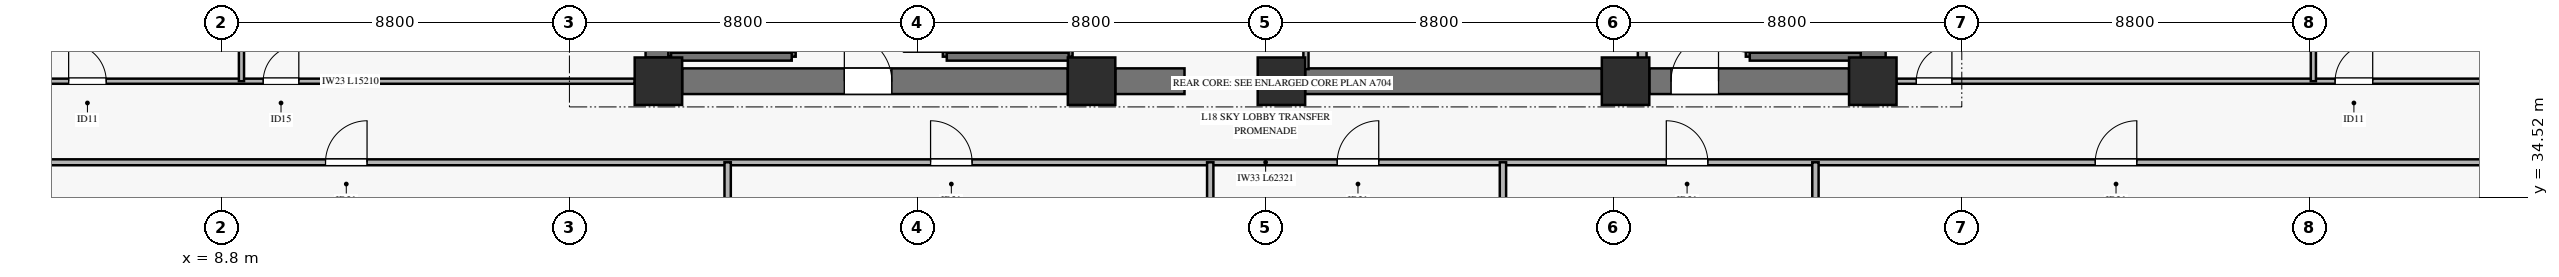
"""IFC4 building model, lengths in metres.
Left out: names, types, materials, properties, quantities, classifications, styles, units other than length and angle.
Written with IfcOpenShell. Run it as: python <this file> out.ifc"""

import sys

from ifc_helpers import new_model, si_unit, direction, frame, frame_2d, origin, origin_2d, place, context, subcontext, project, spatial, rectangle, extrude, source, transform, mapped, element, fill, save


model = new_model("IFC4")
c1 = context("Model", 3, precision=1e-05, world=origin(), true_north=direction((0.0, 1.0)))
c2 = subcontext(c1, "Body", "Model", "MODEL_VIEW")
j1 = project(units=[si_unit("LENGTHUNIT", "METRE"), si_unit("PLANEANGLEUNIT", "RADIAN")], contexts=[c1])
p1 = place(None, origin())
s1 = spatial("IfcSite", under=j1, at=p1, CompositionType="ELEMENT")
p2 = place(p1, origin())
s2 = spatial("IfcBuilding", under=s1, at=p2, CompositionType="ELEMENT")
p3 = place(p2, frame((0.0, 0.0, 72.8)))
s3 = spatial("IfcBuildingStorey", under=s2, at=p3, CompositionType="ELEMENT", Elevation=72.8)
m1 = source(origin(), c2, "Body", "SweptSolid", [
    extrude(rectangle(XDim=1.2, YDim=1.2, at=origin_2d()), origin(), (0.0, 0.0, 1.0), 6.58),
])
for number, where, z_axis, x_axis in (
    (1, (19.85, 37.45, 0.0), (0.0, 0.0, 1.0), (1.0, 0.0, 0.0)),
    (2, (30.8, 37.45, 0.0), (0.0, 0.0, 1.0), (1.0, 0.0, 0.0)),
    (3, (35.6, 37.45, 0.0), (0.0, 0.0, 1.0), (1.0, 0.0, 0.0)),
    (4, (44.3, 37.45, 0.0), (0.0, 0.0, 1.0), (1.0, 0.0, 0.0)),
    (5, (50.55, 37.45, 0.0), (0.0, 0.0, 1.0), (1.0, 0.0, 0.0)),
):
    element("IfcColumn", number, at=place(p3, frame(where, z_axis=z_axis, x_axis=x_axis)), inside=s3, PredefinedType="PILASTER", context=c2, shape_type="MappedRepresentation", body=[
        mapped(m1, transform((0.0, 0.0, 0.0), x_axis=(1.0, 0.0, 0.0), y_axis=(0.0, 1.0, 0.0), z_axis=(0.0, 0.0, 1.0), scale=1.0)),
    ])
p4 = place(p3, frame((20.45, 37.45, 0.0), z_axis=(0.0, 0.0, 1.0), x_axis=(1.0, 0.0, 0.0)))
e6 = element("IfcWall", 6, at=p4, inside=s3, PredefinedType="SHEAR", context=c2, shape_type="SweptSolid", body=[
    extrude(rectangle(XDim=9.75, YDim=0.65, at=frame_2d((4.875, 0.0))), origin(), (0.0, 0.0, 1.0), 6.58),
])
p5 = place(p4, frame((4.1, 0.0, 0.0)))
e7 = element("IfcOpeningElement", 7, at=p5, cuts=e6, PredefinedType="OPENING", context=c2, shape_type="SweptSolid", body=[
    extrude(rectangle(XDim=1.2, YDim=2.15, at=frame_2d((0.6, 1.075))), frame((0.0, 0.335, 0.0), z_axis=(0.0, -1.0, 0.0), x_axis=(1.0, 0.0, 0.0)), (0.0, 0.0, 1.0), 0.67),
])
p6 = place(p3, frame((31.4, 37.45, 0.0), z_axis=(0.0, 0.0, 1.0), x_axis=(1.0, 0.0, 0.0)))
e8 = element("IfcWall", 8, at=p6, inside=s3, PredefinedType="SHEAR", context=c2, shape_type="SweptSolid", body=[
    extrude(rectangle(XDim=1.75, YDim=0.65, at=frame_2d((0.875, 0.0))), origin(), (0.0, 0.0, 1.0), 6.58),
])
p7 = place(p3, frame((36.2, 37.45, 0.0), z_axis=(0.0, 0.0, 1.0), x_axis=(1.0, 0.0, 0.0)))
e9 = element("IfcWall", 9, at=p7, inside=s3, PredefinedType="SHEAR", context=c2, shape_type="SweptSolid", body=[
    extrude(rectangle(XDim=7.5, YDim=0.65, at=frame_2d((3.75, 0.0))), origin(), (0.0, 0.0, 1.0), 6.58),
])
p8 = place(p3, frame((44.9, 37.45, 0.0), z_axis=(0.0, 0.0, 1.0), x_axis=(1.0, 0.0, 0.0)))
e10 = element("IfcWall", 10, at=p8, inside=s3, PredefinedType="SHEAR", context=c2, shape_type="SweptSolid", body=[
    extrude(rectangle(XDim=5.05, YDim=0.65, at=frame_2d((2.525, 0.0))), origin(), (0.0, 0.0, 1.0), 6.58),
])
p9 = place(p8, frame((0.55, 0.0, 0.0)))
e11 = element("IfcOpeningElement", 11, at=p9, cuts=e10, PredefinedType="OPENING", context=c2, shape_type="SweptSolid", body=[
    extrude(rectangle(XDim=1.2, YDim=2.15, at=frame_2d((0.6, 1.075))), frame((0.0, 0.335, 0.0), z_axis=(0.0, -1.0, 0.0), x_axis=(1.0, 0.0, 0.0)), (0.0, 0.0, 1.0), 0.67),
])
for number, where, z_axis, x_axis in (
    (12, (19.85, 38.05, 0.0), (0.0, 0.0, 1.0), (0.0, 1.0, 0.0)),
    (13, (50.55, 38.05, 0.0), (0.0, 0.0, 1.0), (0.0, 1.0, 0.0)),
):
    element("IfcWall", number, at=place(p3, frame(where, z_axis=z_axis, x_axis=x_axis)), inside=s3, PredefinedType="SHEAR", context=c2, shape_type="SweptSolid", body=[
        extrude(rectangle(XDim=7.9, YDim=0.65, at=frame_2d((3.95, 0.0))), origin(), (0.0, 0.0, 1.0), 6.58),
    ])
p10 = place(p3, frame((20.17, 38.07, 0.0), z_axis=(0.0, 0.0, 1.0), x_axis=(0.0, 1.0, 0.0)))
e14 = element("IfcWall", 14, at=p10, inside=s3, PredefinedType="SOLIDWALL", context=c2, shape_type="SweptSolid", body=[
    extrude(rectangle(XDim=7.25, YDim=0.14, at=frame_2d((3.625, 0.0))), origin(), (0.0, 0.0, 1.0), 6.8),
])
p11 = place(p3, frame((23.22, 38.07, 0.0), z_axis=(0.0, 0.0, 1.0), x_axis=(0.0, 1.0, 0.0)))
e15 = element("IfcWall", 15, at=p11, inside=s3, PredefinedType="SOLIDWALL", context=c2, shape_type="SweptSolid", body=[
    extrude(rectangle(XDim=7.25, YDim=0.2, at=frame_2d((3.625, 0.0))), origin(), (0.0, 0.0, 1.0), 6.8),
])
p12 = place(p11, frame((0.11, 0.0, 0.0)))
e16 = element("IfcOpeningElement", 16, at=p12, cuts=e15, PredefinedType="OPENING", context=c2, shape_type="SweptSolid", body=[
    extrude(rectangle(XDim=1.1, YDim=2.15, at=frame_2d((0.55, 1.075))), frame((0.0, 0.11, 0.0), z_axis=(0.0, -1.0, 0.0), x_axis=(1.0, 0.0, 0.0)), (0.0, 0.0, 1.0), 0.22),
])
p13 = place(p3, frame((20.17, 38.07, 0.0), z_axis=(0.0, 0.0, 1.0), x_axis=(1.0, 0.0, 0.0)))
e17 = element("IfcWall", 17, at=p13, inside=s3, PredefinedType="SOLIDWALL", context=c2, shape_type="SweptSolid", body=[
    extrude(rectangle(XDim=3.05, YDim=0.2, at=frame_2d((1.525, 0.0))), origin(), (0.0, 0.0, 1.0), 6.8),
])
p14 = place(p3, frame((27.14, 38.07, 0.0), z_axis=(0.0, 0.0, 1.0), x_axis=(0.0, 1.0, 0.0)))
e18 = element("IfcWall", 18, at=p14, inside=s3, PredefinedType="SOLIDWALL", context=c2, shape_type="SweptSolid", body=[
    extrude(rectangle(XDim=7.25, YDim=0.2, at=frame_2d((3.625, 0.0))), origin(), (0.0, 0.0, 1.0), 6.8),
])
p15 = place(p14, frame((0.11, 0.0, 0.0)))
e19 = element("IfcOpeningElement", 19, at=p15, cuts=e18, PredefinedType="OPENING", context=c2, shape_type="SweptSolid", body=[
    extrude(rectangle(XDim=1.1, YDim=2.15, at=frame_2d((0.55, 1.075))), frame((0.0, 0.11, 0.0), z_axis=(0.0, -1.0, 0.0), x_axis=(1.0, 0.0, 0.0)), (0.0, 0.0, 1.0), 0.22),
])
p16 = place(p3, frame((30.22, 38.07, 0.0), z_axis=(0.0, 0.0, 1.0), x_axis=(0.0, 1.0, 0.0)))
e20 = element("IfcWall", 20, at=p16, inside=s3, PredefinedType="SOLIDWALL", context=c2, shape_type="SweptSolid", body=[
    extrude(rectangle(XDim=7.25, YDim=0.2, at=frame_2d((3.625, 0.0))), origin(), (0.0, 0.0, 1.0), 6.8),
])
p17 = place(p3, frame((27.14, 38.07, 0.0), z_axis=(0.0, 0.0, 1.0), x_axis=(1.0, 0.0, 0.0)))
e21 = element("IfcWall", 21, at=p17, inside=s3, PredefinedType="SOLIDWALL", context=c2, shape_type="SweptSolid", body=[
    extrude(rectangle(XDim=3.08, YDim=0.2, at=frame_2d((1.54, 0.0))), origin(), (0.0, 0.0, 1.0), 6.8),
])
p18 = place(p3, frame((47.44, 38.07, 0.0), z_axis=(0.0, 0.0, 1.0), x_axis=(0.0, 1.0, 0.0)))
e22 = element("IfcWall", 22, at=p18, inside=s3, PredefinedType="SOLIDWALL", context=c2, shape_type="SweptSolid", body=[
    extrude(rectangle(XDim=7.25, YDim=0.2, at=frame_2d((3.625, 0.0))), origin(), (0.0, 0.0, 1.0), 6.8),
])
p19 = place(p18, frame((0.11, 0.0, 0.0)))
e23 = element("IfcOpeningElement", 23, at=p19, cuts=e22, PredefinedType="OPENING", context=c2, shape_type="SweptSolid", body=[
    extrude(rectangle(XDim=1.1, YDim=2.15, at=frame_2d((0.55, 1.075))), frame((0.0, 0.11, 0.0), z_axis=(0.0, -1.0, 0.0), x_axis=(1.0, 0.0, 0.0)), (0.0, 0.0, 1.0), 0.22),
])
p20 = place(p3, frame((47.44, 38.07, 0.0), z_axis=(0.0, 0.0, 1.0), x_axis=(1.0, 0.0, 0.0)))
e24 = element("IfcWall", 24, at=p20, inside=s3, PredefinedType="SOLIDWALL", context=c2, shape_type="SweptSolid", body=[
    extrude(rectangle(XDim=2.805, YDim=0.2, at=frame_2d((1.403, 0.0))), origin(), (0.0, 0.0, 1.0), 6.8),
])
p21 = place(p3, frame((44.72, 37.755, 0.0), z_axis=(0.0, 0.0, 1.0), x_axis=(0.0, 1.0, 0.0)))
e25 = element("IfcWall", 25, at=p21, inside=s3, PredefinedType="SOLIDWALL", context=c2, shape_type="SweptSolid", body=[
    extrude(rectangle(XDim=7.465, YDim=0.22, at=frame_2d((3.732, 0.0))), origin(), (0.0, 0.0, 1.0), 6.58),
])
p22 = place(p3, frame((36.22, 37.755, 0.0), z_axis=(0.0, 0.0, 1.0), x_axis=(0.0, 1.0, 0.0)))
e26 = element("IfcWall", 26, at=p22, inside=s3, PredefinedType="PARTITIONING", context=c2, shape_type="SweptSolid", body=[
    extrude(rectangle(XDim=2.165, YDim=0.13, at=frame_2d((1.083, 0.0))), origin(), (0.0, 0.0, 1.0), 6.58),
])
p23 = place(p22, frame((0.855, 0.0, 0.0)))
e27 = element("IfcOpeningElement", 27, at=p23, cuts=e26, PredefinedType="OPENING", context=c2, shape_type="SweptSolid", body=[
    extrude(rectangle(XDim=0.9, YDim=2.1, at=frame_2d((0.45, 1.05))), frame((0.0, 0.075, 0.0), z_axis=(0.0, -1.0, 0.0), x_axis=(1.0, 0.0, 0.0)), (0.0, 0.0, 1.0), 0.15),
])
p24 = place(p3, frame((4.04, 35.4, 0.0), z_axis=(0.0, 0.0, 1.0), x_axis=(1.0, 0.0, 0.0)))
e28 = element("IfcWall", 28, at=p24, inside=s3, PredefinedType="PARTITIONING", context=c2, shape_type="SweptSolid", body=[
    extrude(rectangle(XDim=62.321, YDim=0.15, at=frame_2d((31.161, 0.0))), origin(), (0.0, 0.0, 1.0), 5.665),
])
p25 = place(p24, frame((7.394, 0.0, 0.0)))
e29 = element("IfcOpeningElement", 29, at=p25, cuts=e28, PredefinedType="OPENING", context=c2, shape_type="SweptSolid", body=[
    extrude(rectangle(XDim=1.05, YDim=2.15, at=frame_2d((0.525, 1.075))), frame((0.0, 0.085, 0.0), z_axis=(0.0, -1.0, 0.0), x_axis=(1.0, 0.0, 0.0)), (0.0, 0.0, 1.0), 0.17),
])
p26 = place(p24, frame((22.69, 0.0, 0.0)))
e30 = element("IfcOpeningElement", 30, at=p26, cuts=e28, PredefinedType="OPENING", context=c2, shape_type="SweptSolid", body=[
    extrude(rectangle(XDim=1.05, YDim=2.15, at=frame_2d((0.525, 1.075))), frame((0.0, 0.085, 0.0), z_axis=(0.0, -1.0, 0.0), x_axis=(1.0, 0.0, 0.0)), (0.0, 0.0, 1.0), 0.17),
])
p27 = place(p24, frame((32.97, 0.0, 0.0)))
e31 = element("IfcOpeningElement", 31, at=p27, cuts=e28, PredefinedType="OPENING", context=c2, shape_type="SweptSolid", body=[
    extrude(rectangle(XDim=1.05, YDim=2.15, at=frame_2d((0.525, 1.075))), frame((0.0, 0.085, 0.0), z_axis=(0.0, -1.0, 0.0), x_axis=(1.0, 0.0, 0.0)), (0.0, 0.0, 1.0), 0.17),
])
p28 = place(p24, frame((41.29, 0.0, 0.0)))
e32 = element("IfcOpeningElement", 32, at=p28, cuts=e28, PredefinedType="OPENING", context=c2, shape_type="SweptSolid", body=[
    extrude(rectangle(XDim=1.05, YDim=2.15, at=frame_2d((0.525, 1.075))), frame((0.0, 0.085, 0.0), z_axis=(0.0, -1.0, 0.0), x_axis=(1.0, 0.0, 0.0)), (0.0, 0.0, 1.0), 0.17),
])
p29 = place(p24, frame((52.134, 0.0, 0.0)))
e33 = element("IfcOpeningElement", 33, at=p29, cuts=e28, PredefinedType="OPENING", context=c2, shape_type="SweptSolid", body=[
    extrude(rectangle(XDim=1.05, YDim=2.15, at=frame_2d((0.525, 1.075))), frame((0.0, 0.085, 0.0), z_axis=(0.0, -1.0, 0.0), x_axis=(1.0, 0.0, 0.0)), (0.0, 0.0, 1.0), 0.17),
])
for number, where, z_axis, x_axis in (
    (34, (21.6, 5.409, 0.0), (0.0, 0.0, 1.0), (0.0, 1.0, 0.0)),
    (35, (33.8, 5.409, 0.0), (0.0, 0.0, 1.0), (0.0, 1.0, 0.0)),
    (36, (41.2, 5.409, 0.0), (0.0, 0.0, 1.0), (0.0, 1.0, 0.0)),
    (37, (49.1, 5.409, 0.0), (0.0, 0.0, 1.0), (0.0, 1.0, 0.0)),
):
    element("IfcWall", number, at=place(p3, frame(where, z_axis=z_axis, x_axis=x_axis)), inside=s3, PredefinedType="PARTITIONING", context=c2, shape_type="SweptSolid", body=[
        extrude(rectangle(XDim=29.991, YDim=0.16, at=frame_2d((14.996, 0.0))), origin(), (0.0, 0.0, 1.0), 6.065),
    ])
p30 = place(p3, frame((4.04, 37.45, 0.0), z_axis=(0.0, 0.0, 1.0), x_axis=(1.0, 0.0, 0.0)))
e38 = element("IfcWall", 38, at=p30, inside=s3, PredefinedType="PARTITIONING", context=c2, shape_type="SweptSolid", body=[
    extrude(rectangle(XDim=15.21, YDim=0.13, at=frame_2d((7.605, 0.0))), origin(), (0.0, 0.0, 1.0), 6.065),
])
p31 = place(p30, frame((0.9, 0.0, 0.0)))
e39 = element("IfcOpeningElement", 39, at=p31, cuts=e38, PredefinedType="OPENING", context=c2, shape_type="SweptSolid", body=[
    extrude(rectangle(XDim=0.95, YDim=2.1, at=frame_2d((0.475, 1.05))), frame((0.0, 0.075, 0.0), z_axis=(0.0, -1.0, 0.0), x_axis=(1.0, 0.0, 0.0)), (0.0, 0.0, 1.0), 0.15),
])
p32 = place(p30, frame((5.819, 0.0, 0.0)))
e40 = element("IfcOpeningElement", 40, at=p32, cuts=e38, PredefinedType="OPENING", context=c2, shape_type="SweptSolid", body=[
    extrude(rectangle(XDim=0.9, YDim=2.1, at=frame_2d((0.45, 1.05))), frame((0.0, 0.075, 0.0), z_axis=(0.0, -1.0, 0.0), x_axis=(1.0, 0.0, 0.0)), (0.0, 0.0, 1.0), 0.15),
])
p33 = place(p3, frame((9.309, 37.45, 0.0), z_axis=(0.0, 0.0, 1.0), x_axis=(0.0, 1.0, 0.0)))
e41 = element("IfcWall", 41, at=p33, inside=s3, PredefinedType="PARTITIONING", context=c2, shape_type="SweptSolid", body=[
    extrude(rectangle(XDim=8.8, YDim=0.13, at=frame_2d((4.4, 0.0))), origin(), (0.0, 0.0, 1.0), 6.58),
])
p34 = place(p3, frame((51.15, 37.45, 0.0), z_axis=(0.0, 0.0, 1.0), x_axis=(1.0, 0.0, 0.0)))
e42 = element("IfcWall", 42, at=p34, inside=s3, PredefinedType="PARTITIONING", context=c2, shape_type="SweptSolid", body=[
    extrude(rectangle(XDim=15.211, YDim=0.13, at=frame_2d((7.605, 0.0))), origin(), (0.0, 0.0, 1.0), 6.065),
])
p35 = place(p34, frame((0.5, 0.0, 0.0)))
e43 = element("IfcOpeningElement", 43, at=p35, cuts=e42, PredefinedType="OPENING", context=c2, shape_type="SweptSolid", body=[
    extrude(rectangle(XDim=0.9, YDim=2.1, at=frame_2d((0.45, 1.05))), frame((0.0, 0.075, 0.0), z_axis=(0.0, -1.0, 0.0), x_axis=(1.0, 0.0, 0.0)), (0.0, 0.0, 1.0), 0.15),
])
p36 = place(p34, frame((11.088, 0.0, 0.0)))
e44 = element("IfcOpeningElement", 44, at=p36, cuts=e42, PredefinedType="OPENING", context=c2, shape_type="SweptSolid", body=[
    extrude(rectangle(XDim=0.95, YDim=2.1, at=frame_2d((0.475, 1.05))), frame((0.0, 0.075, 0.0), z_axis=(0.0, -1.0, 0.0), x_axis=(1.0, 0.0, 0.0)), (0.0, 0.0, 1.0), 0.15),
])
p37 = place(p3, frame((61.688, 37.45, 0.0), z_axis=(0.0, 0.0, 1.0), x_axis=(0.0, 1.0, 0.0)))
e45 = element("IfcWall", 45, at=p37, inside=s3, PredefinedType="PARTITIONING", context=c2, shape_type="SweptSolid", body=[
    extrude(rectangle(XDim=8.8, YDim=0.13, at=frame_2d((4.4, 0.0))), origin(), (0.0, 0.0, 1.0), 6.58),
])
m2 = source(origin(), c2, "Body", "SweptSolid", [
    extrude(rectangle(XDim=1.2, YDim=2.15, at=frame_2d((0.6, 1.075))), frame((0.0, 0.025, 0.0), z_axis=(0.0, -1.0, 0.0), x_axis=(1.0, 0.0, 0.0)), (0.0, 0.0, 1.0), 0.05),
])
p38 = place(p5, origin())
e46 = element("IfcDoor", 46, at=p38, inside=s3, OperationType="SINGLE_SWING_LEFT", PredefinedType="DOOR", context=c2, shape_type="MappedRepresentation", body=[
    mapped(m2, transform((0.0, 0.0, 0.0), x_axis=(1.0, 0.0, 0.0), y_axis=(0.0, 1.0, 0.0), z_axis=(0.0, 0.0, 1.0), scale=1.0)),
])
fill(e7, e46)
p39 = place(p9, origin())
e47 = element("IfcDoor", 47, at=p39, inside=s3, OperationType="SINGLE_SWING_RIGHT", PredefinedType="DOOR", context=c2, shape_type="MappedRepresentation", body=[
    mapped(m2, transform((0.0, 0.0, 0.0), x_axis=(1.0, 0.0, 0.0), y_axis=(0.0, 1.0, 0.0), z_axis=(0.0, 0.0, 1.0), scale=1.0)),
])
fill(e11, e47)
m3 = source(origin(), c2, "Body", "SweptSolid", [
    extrude(rectangle(XDim=1.05, YDim=2.15, at=frame_2d((0.525, 1.075))), frame((0.0, 0.025, 0.0), z_axis=(0.0, -1.0, 0.0), x_axis=(1.0, 0.0, 0.0)), (0.0, 0.0, 1.0), 0.05),
])
p40 = place(p25, origin())
e48 = element("IfcDoor", 48, at=p40, inside=s3, OperationType="SINGLE_SWING_RIGHT", PredefinedType="DOOR", context=c2, shape_type="MappedRepresentation", body=[
    mapped(m3, transform((0.0, 0.0, 0.0), x_axis=(1.0, 0.0, 0.0), y_axis=(0.0, 1.0, 0.0), z_axis=(0.0, 0.0, 1.0), scale=1.0)),
])
fill(e29, e48)
p41 = place(p26, origin())
e49 = element("IfcDoor", 49, at=p41, inside=s3, OperationType="SINGLE_SWING_LEFT", PredefinedType="DOOR", context=c2, shape_type="MappedRepresentation", body=[
    mapped(m3, transform((0.0, 0.0, 0.0), x_axis=(1.0, 0.0, 0.0), y_axis=(0.0, 1.0, 0.0), z_axis=(0.0, 0.0, 1.0), scale=1.0)),
])
fill(e30, e49)
p42 = place(p27, origin())
e50 = element("IfcDoor", 50, at=p42, inside=s3, OperationType="SINGLE_SWING_RIGHT", PredefinedType="DOOR", context=c2, shape_type="MappedRepresentation", body=[
    mapped(m3, transform((0.0, 0.0, 0.0), x_axis=(1.0, 0.0, 0.0), y_axis=(0.0, 1.0, 0.0), z_axis=(0.0, 0.0, 1.0), scale=1.0)),
])
fill(e31, e50)
p43 = place(p28, origin())
e51 = element("IfcDoor", 51, at=p43, inside=s3, OperationType="SINGLE_SWING_LEFT", PredefinedType="DOOR", context=c2, shape_type="MappedRepresentation", body=[
    mapped(m3, transform((0.0, 0.0, 0.0), x_axis=(1.0, 0.0, 0.0), y_axis=(0.0, 1.0, 0.0), z_axis=(0.0, 0.0, 1.0), scale=1.0)),
])
fill(e32, e51)
p44 = place(p29, origin())
e52 = element("IfcDoor", 52, at=p44, inside=s3, OperationType="SINGLE_SWING_RIGHT", PredefinedType="DOOR", context=c2, shape_type="MappedRepresentation", body=[
    mapped(m3, transform((0.0, 0.0, 0.0), x_axis=(1.0, 0.0, 0.0), y_axis=(0.0, 1.0, 0.0), z_axis=(0.0, 0.0, 1.0), scale=1.0)),
])
fill(e33, e52)
m4 = source(origin(), c2, "Body", "SweptSolid", [
    extrude(rectangle(XDim=0.95, YDim=2.1, at=frame_2d((0.475, 1.05))), frame((0.0, 0.025, 0.0), z_axis=(0.0, -1.0, 0.0), x_axis=(1.0, 0.0, 0.0)), (0.0, 0.0, 1.0), 0.05),
])
p45 = place(p31, origin())
e53 = element("IfcDoor", 53, at=p45, inside=s3, OperationType="SINGLE_SWING_LEFT", PredefinedType="DOOR", context=c2, shape_type="MappedRepresentation", body=[
    mapped(m4, transform((0.0, 0.0, 0.0), x_axis=(1.0, 0.0, 0.0), y_axis=(0.0, 1.0, 0.0), z_axis=(0.0, 0.0, 1.0), scale=1.0)),
])
fill(e39, e53)
m5 = source(origin(), c2, "Body", "SweptSolid", [
    extrude(rectangle(XDim=0.9, YDim=2.1, at=frame_2d((0.45, 1.05))), frame((0.0, 0.025, 0.0), z_axis=(0.0, -1.0, 0.0), x_axis=(1.0, 0.0, 0.0)), (0.0, 0.0, 1.0), 0.05),
])
p46 = place(p32, origin())
e54 = element("IfcDoor", 54, at=p46, inside=s3, OperationType="SINGLE_SWING_RIGHT", PredefinedType="DOOR", context=c2, shape_type="MappedRepresentation", body=[
    mapped(m5, transform((0.0, 0.0, 0.0), x_axis=(1.0, 0.0, 0.0), y_axis=(0.0, 1.0, 0.0), z_axis=(0.0, 0.0, 1.0), scale=1.0)),
])
fill(e40, e54)
p47 = place(p35, origin())
e55 = element("IfcDoor", 55, at=p47, inside=s3, OperationType="SINGLE_SWING_RIGHT", PredefinedType="DOOR", context=c2, shape_type="MappedRepresentation", body=[
    mapped(m5, transform((0.0, 0.0, 0.0), x_axis=(1.0, 0.0, 0.0), y_axis=(0.0, 1.0, 0.0), z_axis=(0.0, 0.0, 1.0), scale=1.0)),
])
fill(e43, e55)
p48 = place(p36, origin())
e56 = element("IfcDoor", 56, at=p48, inside=s3, OperationType="SINGLE_SWING_RIGHT", PredefinedType="DOOR", context=c2, shape_type="MappedRepresentation", body=[
    mapped(m4, transform((0.0, 0.0, 0.0), x_axis=(1.0, 0.0, 0.0), y_axis=(0.0, 1.0, 0.0), z_axis=(0.0, 0.0, 1.0), scale=1.0)),
])
fill(e44, e56)
save(model, sys.argv[1])
